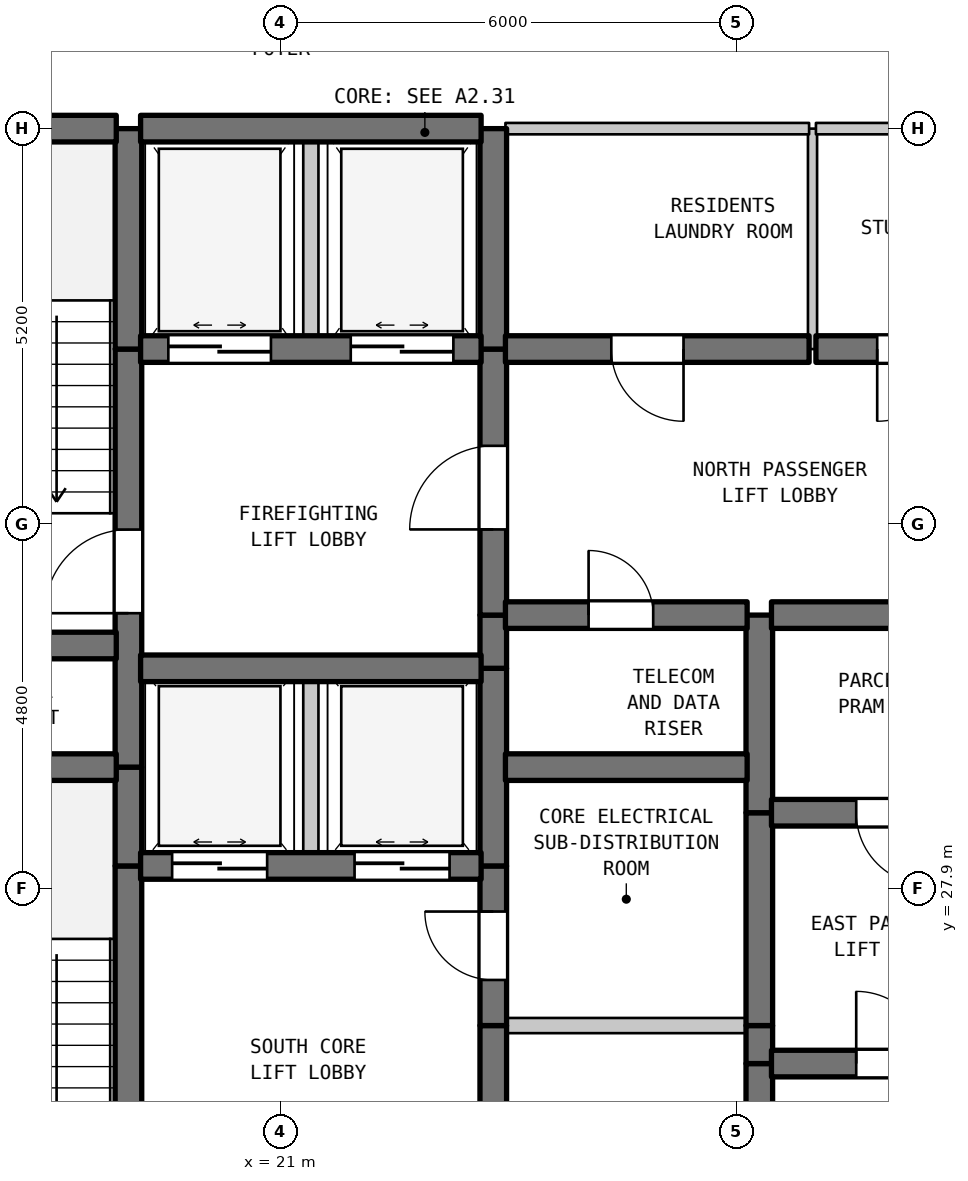
"""IFC4 building model, lengths in metres.
Left out: names, types, materials, properties, quantities, classifications, styles, units other than length and angle.
Written with IfcOpenShell. Run it as: python <this file> out.ifc"""

import sys

from ifc_helpers import new_model, si_unit, direction, frame, frame_2d, origin, place, context, subcontext, project, spatial, rectangle, extrude, element, fill, save


model = new_model("IFC4")
c1 = context("Model", 3, precision=1e-05, world=origin(), true_north=direction((0.0, 1.0)))
c2 = subcontext(c1, "Body", "Model", "MODEL_VIEW")
j1 = project(units=[si_unit("LENGTHUNIT", "METRE"), si_unit("PLANEANGLEUNIT", "RADIAN")], contexts=[c1])
p1 = place(None, origin())
s1 = spatial("IfcSite", under=j1, at=p1, CompositionType="ELEMENT")
p2 = place(p1, origin())
s2 = spatial("IfcBuilding", under=s1, at=p2, CompositionType="ELEMENT")
p3 = place(p2, frame((0.0, 0.0, 280.6)))
s3 = spatial("IfcBuildingStorey", under=s2, at=p3, CompositionType="ELEMENT", Elevation=280.6)
p4 = place(p3, frame((19.0, 22.7, 0.0), z_axis=(0.0, 0.0, 1.0), x_axis=(0.0, 1.0, 0.0)))
e1 = element("IfcWall", 1, at=p4, inside=s3, PredefinedType="SHEAR", context=c2, shape_type="SweptSolid", body=[
    extrude(rectangle(XDim=5.5, YDim=0.35, at=frame_2d((2.75, 0.0))), origin(), (0.0, 0.0, 1.0), 3.39),
])
p5 = place(p4, frame((0.631, 0.0, 0.0)))
e2 = element("IfcOpeningElement", 2, at=p5, cuts=e1, PredefinedType="OPENING", context=c2, shape_type="SweptSolid", body=[
    extrude(rectangle(XDim=1.1, YDim=2.15, at=frame_2d((0.55, 1.075))), frame((0.0, 0.185, 0.0), z_axis=(0.0, -1.0, 0.0), x_axis=(1.0, 0.0, 0.0)), (0.0, 0.0, 1.0), 0.37),
])
p6 = place(p3, frame((19.0, 28.2, 0.0), z_axis=(0.0, 0.0, 1.0), x_axis=(0.0, 1.0, 0.0)))
e3 = element("IfcWall", 3, at=p6, inside=s3, PredefinedType="SHEAR", context=c2, shape_type="SweptSolid", body=[
    extrude(rectangle(XDim=1.3, YDim=0.35, at=frame_2d((0.65, 0.0))), origin(), (0.0, 0.0, 1.0), 3.39),
])
p7 = place(p3, frame((19.0, 29.5, 0.0), z_axis=(0.0, 0.0, 1.0), x_axis=(0.0, 1.0, 0.0)))
e4 = element("IfcWall", 4, at=p7, inside=s3, PredefinedType="SHEAR", context=c2, shape_type="SweptSolid", body=[
    extrude(rectangle(XDim=5.5, YDim=0.35, at=frame_2d((2.75, 0.0))), origin(), (0.0, 0.0, 1.0), 3.39),
])
p8 = place(p7, frame((2.025, 0.0, 0.0)))
e5 = element("IfcOpeningElement", 5, at=p8, cuts=e4, PredefinedType="OPENING", context=c2, shape_type="SweptSolid", body=[
    extrude(rectangle(XDim=1.1, YDim=2.15, at=frame_2d((0.55, 1.075))), frame((0.0, 0.185, 0.0), z_axis=(0.0, -1.0, 0.0), x_axis=(1.0, 0.0, 0.0)), (0.0, 0.0, 1.0), 0.37),
])
p9 = place(p3, frame((19.0, 35.0, 0.0), z_axis=(0.0, 0.0, 1.0), x_axis=(0.0, 1.0, 0.0)))
e6 = element("IfcWall", 6, at=p9, inside=s3, PredefinedType="SHEAR", context=c2, shape_type="SweptSolid", body=[
    extrude(rectangle(XDim=2.9, YDim=0.35, at=frame_2d((1.45, 0.0))), origin(), (0.0, 0.0, 1.0), 3.39),
])
p10 = place(p3, frame((21.4, 28.2, 0.0), z_axis=(0.0, 0.0, 1.0), x_axis=(0.0, 1.0, 0.0)))
e7 = element("IfcWall", 7, at=p10, inside=s3, PredefinedType="STANDARD", context=c2, shape_type="SweptSolid", body=[
    extrude(rectangle(XDim=2.6, YDim=0.2, at=frame_2d((1.3, 0.0))), origin(), (0.0, 0.0, 1.0), 3.39),
])
p11 = place(p3, frame((21.4, 35.0, 0.0), z_axis=(0.0, 0.0, 1.0), x_axis=(0.0, 1.0, 0.0)))
e8 = element("IfcWall", 8, at=p11, inside=s3, PredefinedType="STANDARD", context=c2, shape_type="SweptSolid", body=[
    extrude(rectangle(XDim=2.9, YDim=0.2, at=frame_2d((1.45, 0.0))), origin(), (0.0, 0.0, 1.0), 3.39),
])
p12 = place(p3, frame((23.8, 19.5, 0.0), z_axis=(0.0, 0.0, 1.0), x_axis=(0.0, 1.0, 0.0)))
e9 = element("IfcWall", 9, at=p12, inside=s3, PredefinedType="SHEAR", context=c2, shape_type="SweptSolid", body=[
    extrude(rectangle(XDim=6.6, YDim=0.35, at=frame_2d((3.3, 0.0))), origin(), (0.0, 0.0, 1.0), 3.39),
])
p13 = place(p12, frame((4.304, 0.0, 0.0)))
e10 = element("IfcOpeningElement", 10, at=p13, cuts=e9, PredefinedType="OPENING", context=c2, shape_type="SweptSolid", body=[
    extrude(rectangle(XDim=0.9, YDim=2.15, at=frame_2d((0.45, 1.075))), frame((0.0, 0.185, 0.0), z_axis=(0.0, -1.0, 0.0), x_axis=(1.0, 0.0, 0.0)), (0.0, 0.0, 1.0), 0.37),
])
p14 = place(p3, frame((23.8, 26.1, 0.0), z_axis=(0.0, 0.0, 1.0), x_axis=(0.0, 1.0, 0.0)))
e11 = element("IfcWall", 11, at=p14, inside=s3, PredefinedType="SHEAR", context=c2, shape_type="SweptSolid", body=[
    extrude(rectangle(XDim=2.1, YDim=0.35, at=frame_2d((1.05, 0.0))), origin(), (0.0, 0.0, 1.0), 3.39),
])
p15 = place(p14, frame((0.6, 0.0, 0.0)))
e12 = element("IfcOpeningElement", 12, at=p15, cuts=e11, PredefinedType="OPENING", context=c2, shape_type="SweptSolid", body=[
    extrude(rectangle(XDim=0.9, YDim=2.15, at=frame_2d((0.45, 1.075))), frame((0.0, 0.185, 0.0), z_axis=(0.0, -1.0, 0.0), x_axis=(1.0, 0.0, 0.0)), (0.0, 0.0, 1.0), 0.37),
])
p16 = place(p3, frame((23.8, 28.2, 0.0), z_axis=(0.0, 0.0, 1.0), x_axis=(0.0, 1.0, 0.0)))
e13 = element("IfcWall", 13, at=p16, inside=s3, PredefinedType="SHEAR", context=c2, shape_type="SweptSolid", body=[
    extrude(rectangle(XDim=2.6, YDim=0.35, at=frame_2d((1.3, 0.0))), origin(), (0.0, 0.0, 1.0), 3.39),
])
p17 = place(p3, frame((23.8, 30.8, 0.0), z_axis=(0.0, 0.0, 1.0), x_axis=(0.0, 1.0, 0.0)))
e14 = element("IfcWall", 14, at=p17, inside=s3, PredefinedType="SHEAR", context=c2, shape_type="SweptSolid", body=[
    extrude(rectangle(XDim=0.7, YDim=0.35, at=frame_2d((0.35, 0.0))), origin(), (0.0, 0.0, 1.0), 3.39),
])
p18 = place(p3, frame((23.8, 31.5, 0.0), z_axis=(0.0, 0.0, 1.0), x_axis=(0.0, 1.0, 0.0)))
e15 = element("IfcWall", 15, at=p18, inside=s3, PredefinedType="SHEAR", context=c2, shape_type="SweptSolid", body=[
    extrude(rectangle(XDim=3.5, YDim=0.35, at=frame_2d((1.75, 0.0))), origin(), (0.0, 0.0, 1.0), 3.39),
])
p19 = place(p18, frame((1.127, 0.0, 0.0)))
e16 = element("IfcOpeningElement", 16, at=p19, cuts=e15, PredefinedType="OPENING", context=c2, shape_type="SweptSolid", body=[
    extrude(rectangle(XDim=1.1, YDim=2.15, at=frame_2d((0.55, 1.075))), frame((0.0, 0.185, 0.0), z_axis=(0.0, -1.0, 0.0), x_axis=(1.0, 0.0, 0.0)), (0.0, 0.0, 1.0), 0.37),
])
p20 = place(p3, frame((23.8, 35.0, 0.0), z_axis=(0.0, 0.0, 1.0), x_axis=(0.0, 1.0, 0.0)))
e17 = element("IfcWall", 17, at=p20, inside=s3, PredefinedType="SHEAR", context=c2, shape_type="SweptSolid", body=[
    extrude(rectangle(XDim=2.9, YDim=0.35, at=frame_2d((1.45, 0.0))), origin(), (0.0, 0.0, 1.0), 3.39),
])
p21 = place(p3, frame((27.3, 22.7, 0.0), z_axis=(0.0, 0.0, 1.0), x_axis=(0.0, 1.0, 0.0)))
e18 = element("IfcWall", 18, at=p21, inside=s3, PredefinedType="SHEAR", context=c2, shape_type="SweptSolid", body=[
    extrude(rectangle(XDim=2.9, YDim=0.35, at=frame_2d((1.45, 0.0))), origin(), (0.0, 0.0, 1.0), 3.39),
])
p22 = place(p3, frame((27.3, 25.6, 0.0), z_axis=(0.0, 0.0, 1.0), x_axis=(0.0, 1.0, 0.0)))
e19 = element("IfcWall", 19, at=p22, inside=s3, PredefinedType="SHEAR", context=c2, shape_type="SweptSolid", body=[
    extrude(rectangle(XDim=0.5, YDim=0.35, at=frame_2d((0.25, 0.0))), origin(), (0.0, 0.0, 1.0), 3.39),
])
p23 = place(p3, frame((27.3, 26.1, 0.0), z_axis=(0.0, 0.0, 1.0), x_axis=(0.0, 1.0, 0.0)))
e20 = element("IfcWall", 20, at=p23, inside=s3, PredefinedType="SHEAR", context=c2, shape_type="SweptSolid", body=[
    extrude(rectangle(XDim=2.8, YDim=0.35, at=frame_2d((1.4, 0.0))), origin(), (0.0, 0.0, 1.0), 3.39),
])
p24 = place(p3, frame((27.3, 28.9, 0.0), z_axis=(0.0, 0.0, 1.0), x_axis=(0.0, 1.0, 0.0)))
e21 = element("IfcWall", 21, at=p24, inside=s3, PredefinedType="SHEAR", context=c2, shape_type="SweptSolid", body=[
    extrude(rectangle(XDim=2.6, YDim=0.35, at=frame_2d((1.3, 0.0))), origin(), (0.0, 0.0, 1.0), 3.39),
])
p25 = place(p3, frame((28.0, 35.0, 0.0), z_axis=(0.0, 0.0, 1.0), x_axis=(0.0, 1.0, 0.0)))
e22 = element("IfcWall", 22, at=p25, inside=s3, PredefinedType="PARTITIONING", context=c2, shape_type="SweptSolid", body=[
    extrude(rectangle(XDim=2.9, YDim=0.12, at=frame_2d((1.45, 0.0))), origin(), (0.0, 0.0, 1.0), 3.39),
])
p26 = place(p3, frame((27.46, 25.6, 0.0), z_axis=(0.0, 0.0, 1.0), x_axis=(1.0, 0.0, 0.0)))
e23 = element("IfcWall", 23, at=p26, inside=s3, PredefinedType="SHEAR", context=c2, shape_type="SweptSolid", body=[
    extrude(rectangle(XDim=3.18, YDim=0.35, at=frame_2d((1.59, 0.0))), origin(), (0.0, 0.0, 1.0), 3.39),
])
p27 = place(p26, frame((1.115, 0.0, 0.0)))
e24 = element("IfcOpeningElement", 24, at=p27, cuts=e23, PredefinedType="OPENING", context=c2, shape_type="SweptSolid", body=[
    extrude(rectangle(XDim=0.95, YDim=2.15, at=frame_2d((0.475, 1.075))), frame((0.0, 0.185, 0.0), z_axis=(0.0, -1.0, 0.0), x_axis=(1.0, 0.0, 0.0)), (0.0, 0.0, 1.0), 0.37),
])
p28 = place(p3, frame((23.96, 26.1, 0.0), z_axis=(0.0, 0.0, 1.0), x_axis=(1.0, 0.0, 0.0)))
e25 = element("IfcWall", 25, at=p28, inside=s3, PredefinedType="STANDARD", context=c2, shape_type="SweptSolid", body=[
    extrude(rectangle(XDim=3.18, YDim=0.2, at=frame_2d((1.59, 0.0))), origin(), (0.0, 0.0, 1.0), 3.39),
])
p29 = place(p3, frame((19.16, 28.2, 0.0), z_axis=(0.0, 0.0, 1.0), x_axis=(1.0, 0.0, 0.0)))
e26 = element("IfcWall", 26, at=p29, inside=s3, PredefinedType="SHEAR", context=c2, shape_type="SweptSolid", body=[
    extrude(rectangle(XDim=4.48, YDim=0.35, at=frame_2d((2.24, 0.0))), origin(), (0.0, 0.0, 1.0), 3.39),
])
p30 = place(p29, frame((0.415, 0.0, 0.0)))
e27 = element("IfcOpeningElement", 27, at=p30, cuts=e26, PredefinedType="OPENING", context=c2, shape_type="SweptSolid", body=[
    extrude(rectangle(XDim=1.25, YDim=2.2, at=frame_2d((0.625, 1.1))), frame((0.0, 0.185, 0.0), z_axis=(0.0, -1.0, 0.0), x_axis=(1.0, 0.0, 0.0)), (0.0, 0.0, 1.0), 0.37),
])
p31 = place(p29, frame((2.815, 0.0, 0.0)))
e28 = element("IfcOpeningElement", 28, at=p31, cuts=e26, PredefinedType="OPENING", context=c2, shape_type="SweptSolid", body=[
    extrude(rectangle(XDim=1.25, YDim=2.2, at=frame_2d((0.625, 1.1))), frame((0.0, 0.185, 0.0), z_axis=(0.0, -1.0, 0.0), x_axis=(1.0, 0.0, 0.0)), (0.0, 0.0, 1.0), 0.37),
])
p32 = place(p3, frame((27.46, 28.9, 0.0), z_axis=(0.0, 0.0, 1.0), x_axis=(1.0, 0.0, 0.0)))
e29 = element("IfcWall", 29, at=p32, inside=s3, PredefinedType="SHEAR", context=c2, shape_type="SweptSolid", body=[
    extrude(rectangle(XDim=3.18, YDim=0.35, at=frame_2d((1.59, 0.0))), origin(), (0.0, 0.0, 1.0), 3.39),
])
p33 = place(p32, frame((1.115, 0.0, 0.0)))
e30 = element("IfcOpeningElement", 30, at=p33, cuts=e29, PredefinedType="OPENING", context=c2, shape_type="SweptSolid", body=[
    extrude(rectangle(XDim=0.95, YDim=2.15, at=frame_2d((0.475, 1.075))), frame((0.0, 0.185, 0.0), z_axis=(0.0, -1.0, 0.0), x_axis=(1.0, 0.0, 0.0)), (0.0, 0.0, 1.0), 0.37),
])
p34 = place(p3, frame((15.16, 29.5, 0.0), z_axis=(0.0, 0.0, 1.0), x_axis=(1.0, 0.0, 0.0)))
e31 = element("IfcWall", 31, at=p34, inside=s3, PredefinedType="SHEAR", context=c2, shape_type="SweptSolid", body=[
    extrude(rectangle(XDim=3.68, YDim=0.35, at=frame_2d((1.84, 0.0))), origin(), (0.0, 0.0, 1.0), 3.39),
])
p35 = place(p3, frame((23.96, 29.5, 0.0), z_axis=(0.0, 0.0, 1.0), x_axis=(1.0, 0.0, 0.0)))
e32 = element("IfcWall", 32, at=p35, inside=s3, PredefinedType="SHEAR", context=c2, shape_type="SweptSolid", body=[
    extrude(rectangle(XDim=3.18, YDim=0.35, at=frame_2d((1.59, 0.0))), origin(), (0.0, 0.0, 1.0), 3.39),
])
p36 = place(p3, frame((19.16, 30.8, 0.0), z_axis=(0.0, 0.0, 1.0), x_axis=(1.0, 0.0, 0.0)))
e33 = element("IfcWall", 33, at=p36, inside=s3, PredefinedType="SHEAR", context=c2, shape_type="SweptSolid", body=[
    extrude(rectangle(XDim=4.48, YDim=0.35, at=frame_2d((2.24, 0.0))), origin(), (0.0, 0.0, 1.0), 3.39),
])
p37 = place(p3, frame((15.16, 31.1, 0.0), z_axis=(0.0, 0.0, 1.0), x_axis=(1.0, 0.0, 0.0)))
e34 = element("IfcWall", 34, at=p37, inside=s3, PredefinedType="SHEAR", context=c2, shape_type="SweptSolid", body=[
    extrude(rectangle(XDim=3.68, YDim=0.35, at=frame_2d((1.84, 0.0))), origin(), (0.0, 0.0, 1.0), 3.39),
])
p38 = place(p3, frame((23.96, 31.5, 0.0), z_axis=(0.0, 0.0, 1.0), x_axis=(1.0, 0.0, 0.0)))
e35 = element("IfcWall", 35, at=p38, inside=s3, PredefinedType="SHEAR", context=c2, shape_type="SweptSolid", body=[
    extrude(rectangle(XDim=3.18, YDim=0.35, at=frame_2d((1.59, 0.0))), origin(), (0.0, 0.0, 1.0), 3.39),
])
p39 = place(p38, frame((1.094, 0.0, 0.0)))
e36 = element("IfcOpeningElement", 36, at=p39, cuts=e35, PredefinedType="OPENING", context=c2, shape_type="SweptSolid", body=[
    extrude(rectangle(XDim=0.85, YDim=2.1, at=frame_2d((0.425, 1.05))), frame((0.0, 0.185, 0.0), z_axis=(0.0, -1.0, 0.0), x_axis=(1.0, 0.0, 0.0)), (0.0, 0.0, 1.0), 0.37),
])
p40 = place(p3, frame((27.46, 31.5, 0.0), z_axis=(0.0, 0.0, 1.0), x_axis=(1.0, 0.0, 0.0)))
e37 = element("IfcWall", 37, at=p40, inside=s3, PredefinedType="SHEAR", context=c2, shape_type="SweptSolid", body=[
    extrude(rectangle(XDim=3.18, YDim=0.35, at=frame_2d((1.59, 0.0))), origin(), (0.0, 0.0, 1.0), 3.39),
])
p41 = place(p3, frame((19.16, 35.0, 0.0), z_axis=(0.0, 0.0, 1.0), x_axis=(1.0, 0.0, 0.0)))
e38 = element("IfcWall", 38, at=p41, inside=s3, PredefinedType="SHEAR", context=c2, shape_type="SweptSolid", body=[
    extrude(rectangle(XDim=4.48, YDim=0.35, at=frame_2d((2.24, 0.0))), origin(), (0.0, 0.0, 1.0), 3.39),
])
p42 = place(p41, frame((0.365, 0.0, 0.0)))
e39 = element("IfcOpeningElement", 39, at=p42, cuts=e38, PredefinedType="OPENING", context=c2, shape_type="SweptSolid", body=[
    extrude(rectangle(XDim=1.35, YDim=2.2, at=frame_2d((0.675, 1.1))), frame((0.0, 0.185, 0.0), z_axis=(0.0, -1.0, 0.0), x_axis=(1.0, 0.0, 0.0)), (0.0, 0.0, 1.0), 0.37),
])
p43 = place(p41, frame((2.765, 0.0, 0.0)))
e40 = element("IfcOpeningElement", 40, at=p43, cuts=e38, PredefinedType="OPENING", context=c2, shape_type="SweptSolid", body=[
    extrude(rectangle(XDim=1.35, YDim=2.2, at=frame_2d((0.675, 1.1))), frame((0.0, 0.185, 0.0), z_axis=(0.0, -1.0, 0.0), x_axis=(1.0, 0.0, 0.0)), (0.0, 0.0, 1.0), 0.37),
])
p44 = place(p3, frame((23.96, 35.0, 0.0), z_axis=(0.0, 0.0, 1.0), x_axis=(1.0, 0.0, 0.0)))
e41 = element("IfcWall", 41, at=p44, inside=s3, PredefinedType="SHEAR", context=c2, shape_type="SweptSolid", body=[
    extrude(rectangle(XDim=3.995, YDim=0.35, at=frame_2d((1.998, 0.0))), origin(), (0.0, 0.0, 1.0), 3.39),
])
p45 = place(p44, frame((1.393, 0.0, 0.0)))
e42 = element("IfcOpeningElement", 42, at=p45, cuts=e41, PredefinedType="OPENING", context=c2, shape_type="SweptSolid", body=[
    extrude(rectangle(XDim=0.95, YDim=2.15, at=frame_2d((0.475, 1.075))), frame((0.0, 0.185, 0.0), z_axis=(0.0, -1.0, 0.0), x_axis=(1.0, 0.0, 0.0)), (0.0, 0.0, 1.0), 0.37),
])
p46 = place(p3, frame((28.045, 35.0, 0.0), z_axis=(0.0, 0.0, 1.0), x_axis=(1.0, 0.0, 0.0)))
e43 = element("IfcWall", 43, at=p46, inside=s3, PredefinedType="SHEAR", context=c2, shape_type="SweptSolid", body=[
    extrude(rectangle(XDim=2.595, YDim=0.35, at=frame_2d((1.297, 0.0))), origin(), (0.0, 0.0, 1.0), 3.39),
])
p47 = place(p46, frame((0.806, 0.0, 0.0)))
e44 = element("IfcOpeningElement", 44, at=p47, cuts=e43, PredefinedType="OPENING", context=c2, shape_type="SweptSolid", body=[
    extrude(rectangle(XDim=0.95, YDim=2.15, at=frame_2d((0.475, 1.075))), frame((0.0, 0.185, 0.0), z_axis=(0.0, -1.0, 0.0), x_axis=(1.0, 0.0, 0.0)), (0.0, 0.0, 1.0), 0.37),
])
p48 = place(p3, frame((15.16, 37.9, 0.0), z_axis=(0.0, 0.0, 1.0), x_axis=(1.0, 0.0, 0.0)))
e45 = element("IfcWall", 45, at=p48, inside=s3, PredefinedType="SHEAR", context=c2, shape_type="SweptSolid", body=[
    extrude(rectangle(XDim=3.68, YDim=0.35, at=frame_2d((1.84, 0.0))), origin(), (0.0, 0.0, 1.0), 3.39),
])
p49 = place(p3, frame((19.16, 37.9, 0.0), z_axis=(0.0, 0.0, 1.0), x_axis=(1.0, 0.0, 0.0)))
e46 = element("IfcWall", 46, at=p49, inside=s3, PredefinedType="SHEAR", context=c2, shape_type="SweptSolid", body=[
    extrude(rectangle(XDim=4.48, YDim=0.35, at=frame_2d((2.24, 0.0))), origin(), (0.0, 0.0, 1.0), 3.39),
])
p50 = place(p3, frame((23.96, 37.9, 0.0), z_axis=(0.0, 0.0, 1.0), x_axis=(1.0, 0.0, 0.0)))
e47 = element("IfcWall", 47, at=p50, inside=s3, PredefinedType="STANDARD", context=c2, shape_type="SweptSolid", body=[
    extrude(rectangle(XDim=3.995, YDim=0.15, at=frame_2d((1.998, 0.0))), origin(), (0.0, 0.0, 1.0), 2.89),
])
p51 = place(p3, frame((28.045, 37.9, 0.0), z_axis=(0.0, 0.0, 1.0), x_axis=(1.0, 0.0, 0.0)))
e48 = element("IfcWall", 48, at=p51, inside=s3, PredefinedType="STANDARD", context=c2, shape_type="SweptSolid", body=[
    extrude(rectangle(XDim=2.695, YDim=0.15, at=frame_2d((1.348, 0.0))), origin(), (0.0, 0.0, 1.0), 2.89),
])
p52 = place(p8, origin())
e49 = element("IfcDoor", 49, at=p52, inside=s3, OperationType="SINGLE_SWING_LEFT", PredefinedType="DOOR", context=c2, shape_type="SweptSolid", body=[
    extrude(rectangle(XDim=1.1, YDim=2.15, at=frame_2d((0.55, 1.075))), frame((0.0, 0.025, 0.0), z_axis=(0.0, -1.0, 0.0), x_axis=(1.0, 0.0, 0.0)), (0.0, 0.0, 1.0), 0.05),
])
fill(e5, e49)
p53 = place(p15, origin())
e50 = element("IfcDoor", 50, at=p53, inside=s3, OperationType="SINGLE_SWING_RIGHT", PredefinedType="DOOR", context=c2, shape_type="SweptSolid", body=[
    extrude(rectangle(XDim=0.9, YDim=2.15, at=frame_2d((0.45, 1.075))), frame((0.0, 0.025, 0.0), z_axis=(0.0, -1.0, 0.0), x_axis=(1.0, 0.0, 0.0)), (0.0, 0.0, 1.0), 0.05),
])
fill(e12, e50)
p54 = place(p19, origin())
e51 = element("IfcDoor", 51, at=p54, inside=s3, OperationType="SINGLE_SWING_LEFT", PredefinedType="DOOR", context=c2, shape_type="SweptSolid", body=[
    extrude(rectangle(XDim=1.1, YDim=2.15, at=frame_2d((0.55, 1.075))), frame((0.0, 0.025, 0.0), z_axis=(0.0, -1.0, 0.0), x_axis=(1.0, 0.0, 0.0)), (0.0, 0.0, 1.0), 0.05),
])
fill(e16, e51)
p55 = place(p27, origin())
e52 = element("IfcDoor", 52, at=p55, inside=s3, OperationType="SINGLE_SWING_LEFT", PredefinedType="DOOR", context=c2, shape_type="SweptSolid", body=[
    extrude(rectangle(XDim=0.95, YDim=2.15, at=frame_2d((0.475, 1.075))), frame((0.0, 0.025, 0.0), z_axis=(0.0, -1.0, 0.0), x_axis=(1.0, 0.0, 0.0)), (0.0, 0.0, 1.0), 0.05),
])
fill(e24, e52)
p56 = place(p30, origin())
e53 = element("IfcDoor", 53, at=p56, inside=s3, OperationType="DOUBLE_DOOR_SLIDING", PredefinedType="DOOR", context=c2, shape_type="SweptSolid", body=[
    extrude(rectangle(XDim=1.25, YDim=2.2, at=frame_2d((0.625, 1.1))), frame((0.0, 0.025, 0.0), z_axis=(0.0, -1.0, 0.0), x_axis=(1.0, 0.0, 0.0)), (0.0, 0.0, 1.0), 0.05),
])
fill(e27, e53)
p57 = place(p31, origin())
e54 = element("IfcDoor", 54, at=p57, inside=s3, OperationType="DOUBLE_DOOR_SLIDING", PredefinedType="DOOR", context=c2, shape_type="SweptSolid", body=[
    extrude(rectangle(XDim=1.25, YDim=2.2, at=frame_2d((0.625, 1.1))), frame((0.0, 0.025, 0.0), z_axis=(0.0, -1.0, 0.0), x_axis=(1.0, 0.0, 0.0)), (0.0, 0.0, 1.0), 0.05),
])
fill(e28, e54)
p58 = place(p33, frame((0.95, 0.0, 0.0), z_axis=(0.0, 0.0, 1.0), x_axis=(-1.0, 0.0, 0.0)))
e55 = element("IfcDoor", 55, at=p58, inside=s3, OperationType="SINGLE_SWING_RIGHT", PredefinedType="DOOR", context=c2, shape_type="SweptSolid", body=[
    extrude(rectangle(XDim=0.95, YDim=2.15, at=frame_2d((0.475, 1.075))), frame((0.0, 0.025, 0.0), z_axis=(0.0, -1.0, 0.0), x_axis=(1.0, 0.0, 0.0)), (0.0, 0.0, 1.0), 0.05),
])
fill(e30, e55)
p59 = place(p39, origin())
e56 = element("IfcDoor", 56, at=p59, inside=s3, OperationType="SINGLE_SWING_LEFT", PredefinedType="DOOR", context=c2, shape_type="SweptSolid", body=[
    extrude(rectangle(XDim=0.85, YDim=2.1, at=frame_2d((0.425, 1.05))), frame((0.0, 0.025, 0.0), z_axis=(0.0, -1.0, 0.0), x_axis=(1.0, 0.0, 0.0)), (0.0, 0.0, 1.0), 0.05),
])
fill(e36, e56)
p60 = place(p42, origin())
e57 = element("IfcDoor", 57, at=p60, inside=s3, OperationType="DOUBLE_DOOR_SLIDING", PredefinedType="DOOR", context=c2, shape_type="SweptSolid", body=[
    extrude(rectangle(XDim=1.35, YDim=2.2, at=frame_2d((0.675, 1.1))), frame((0.0, 0.025, 0.0), z_axis=(0.0, -1.0, 0.0), x_axis=(1.0, 0.0, 0.0)), (0.0, 0.0, 1.0), 0.05),
])
fill(e39, e57)
p61 = place(p43, origin())
e58 = element("IfcDoor", 58, at=p61, inside=s3, OperationType="DOUBLE_DOOR_SLIDING", PredefinedType="DOOR", context=c2, shape_type="SweptSolid", body=[
    extrude(rectangle(XDim=1.35, YDim=2.2, at=frame_2d((0.675, 1.1))), frame((0.0, 0.025, 0.0), z_axis=(0.0, -1.0, 0.0), x_axis=(1.0, 0.0, 0.0)), (0.0, 0.0, 1.0), 0.05),
])
fill(e40, e58)
p62 = place(p45, frame((0.95, 0.0, 0.0), z_axis=(0.0, 0.0, 1.0), x_axis=(-1.0, 0.0, 0.0)))
e59 = element("IfcDoor", 59, at=p62, inside=s3, OperationType="SINGLE_SWING_RIGHT", PredefinedType="DOOR", context=c2, shape_type="SweptSolid", body=[
    extrude(rectangle(XDim=0.95, YDim=2.15, at=frame_2d((0.475, 1.075))), frame((0.0, 0.025, 0.0), z_axis=(0.0, -1.0, 0.0), x_axis=(1.0, 0.0, 0.0)), (0.0, 0.0, 1.0), 0.05),
])
fill(e42, e59)
p63 = place(p47, frame((0.95, 0.0, 0.0), z_axis=(0.0, 0.0, 1.0), x_axis=(-1.0, 0.0, 0.0)))
e60 = element("IfcDoor", 60, at=p63, inside=s3, OperationType="SINGLE_SWING_LEFT", PredefinedType="DOOR", context=c2, shape_type="SweptSolid", body=[
    extrude(rectangle(XDim=0.95, YDim=2.15, at=frame_2d((0.475, 1.075))), frame((0.0, 0.025, 0.0), z_axis=(0.0, -1.0, 0.0), x_axis=(1.0, 0.0, 0.0)), (0.0, 0.0, 1.0), 0.05),
])
fill(e44, e60)
save(model, sys.argv[1])
